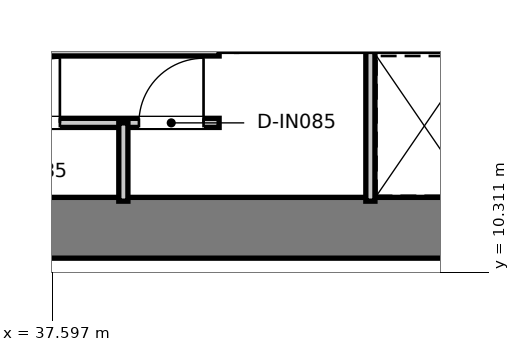
"""IFC4 building model, lengths in metres.
Left out: names, types, materials, properties, quantities, classifications, styles, units other than length and angle.
Written with IfcOpenShell. Run it as: python <this file> out.ifc"""

import sys

from ifc_helpers import new_model, si_unit, direction, frame, frame_2d, origin, place, context, subcontext, project, spatial, rectangle, extrude, element, fill, save


model = new_model("IFC4")
c1 = context("Model", 3, precision=1e-05, world=origin(), true_north=direction((0.0, 1.0)))
c2 = subcontext(c1, "Body", "Model", "MODEL_VIEW")
j1 = project(units=[si_unit("LENGTHUNIT", "METRE"), si_unit("PLANEANGLEUNIT", "RADIAN")], contexts=[c1])
p1 = place(None, origin())
s1 = spatial("IfcSite", under=j1, at=p1, CompositionType="ELEMENT")
p2 = place(p1, origin())
s2 = spatial("IfcBuilding", under=s1, at=p2, CompositionType="ELEMENT")
p3 = place(p2, frame((0.0, 0.0, 185.7)))
s3 = spatial("IfcBuildingStorey", under=s2, at=p3, CompositionType="ELEMENT", Elevation=185.7)
p4 = place(p3, frame((28.08, 10.9, 0.0), z_axis=(0.0, 0.0, 1.0), x_axis=(1.0, 0.0, 0.0)))
e1 = element("IfcWall", 1, at=p4, inside=s3, PredefinedType="SHEAR", context=c2, shape_type="SweptSolid", body=[
    extrude(rectangle(XDim=15.84, YDim=0.8, at=frame_2d((7.92, 0.0))), origin(), (0.0, 0.0, 1.0), 3.95),
])
p5 = place(p3, frame((41.78, 11.25, 0.0), z_axis=(0.0, 0.0, 1.0), x_axis=(0.0, 1.0, 0.0)))
e2 = element("IfcWall", 2, at=p5, inside=s3, PredefinedType="PARTITIONING", context=c2, shape_type="SweptSolid", body=[
    extrude(rectangle(XDim=1.97, YDim=0.12, at=frame_2d((0.985, 0.0))), origin(), (0.0, 0.0, 1.0), 3.67),
])
p6 = place(p3, frame((32.21, 13.22, 0.0), z_axis=(0.0, 0.0, 1.0), x_axis=(1.0, 0.0, 0.0)))
e3 = element("IfcWall", 3, at=p6, inside=s3, PredefinedType="PARTITIONING", context=c2, shape_type="SweptSolid", body=[
    extrude(rectangle(XDim=7.58, YDim=0.12, at=frame_2d((3.79, 0.0))), origin(), (0.0, 0.0, 1.0), 3.67),
])
p7 = place(p6, frame((3.365, 0.0, 0.0)))
e4 = element("IfcOpeningElement", 4, at=p7, cuts=e3, PredefinedType="OPENING", context=c2, shape_type="SweptSolid", body=[
    extrude(rectangle(XDim=0.85, YDim=2.1, at=frame_2d((0.425, 1.05))), frame((0.0, 0.07, 0.0), z_axis=(0.0, -1.0, 0.0), x_axis=(1.0, 0.0, 0.0)), (0.0, 0.0, 1.0), 0.14),
])
p8 = place(p3, frame((32.21, 12.28, 0.0), z_axis=(0.0, 0.0, 1.0), x_axis=(1.0, 0.0, 0.0)))
e5 = element("IfcWall", 5, at=p8, inside=s3, PredefinedType="PARTITIONING", context=c2, shape_type="SweptSolid", body=[
    extrude(rectangle(XDim=7.58, YDim=0.12, at=frame_2d((3.79, 0.0))), origin(), (0.0, 0.0, 1.0), 3.67),
])
p9 = place(p8, frame((0.205, 0.0, 0.0)))
e6 = element("IfcOpeningElement", 6, at=p9, cuts=e5, PredefinedType="OPENING", context=c2, shape_type="SweptSolid", body=[
    extrude(rectangle(XDim=0.85, YDim=2.1, at=frame_2d((0.425, 1.05))), frame((0.0, 0.07, 0.0), z_axis=(0.0, -1.0, 0.0), x_axis=(1.0, 0.0, 0.0)), (0.0, 0.0, 1.0), 0.14),
])
p10 = place(p8, frame((2.095, 0.0, 0.0)))
e7 = element("IfcOpeningElement", 7, at=p10, cuts=e5, PredefinedType="OPENING", context=c2, shape_type="SweptSolid", body=[
    extrude(rectangle(XDim=0.85, YDim=2.1, at=frame_2d((0.425, 1.05))), frame((0.0, 0.07, 0.0), z_axis=(0.0, -1.0, 0.0), x_axis=(1.0, 0.0, 0.0)), (0.0, 0.0, 1.0), 0.14),
])
p11 = place(p8, frame((4.635, 0.0, 0.0)))
e8 = element("IfcOpeningElement", 8, at=p11, cuts=e5, PredefinedType="OPENING", context=c2, shape_type="SweptSolid", body=[
    extrude(rectangle(XDim=0.85, YDim=2.1, at=frame_2d((0.425, 1.05))), frame((0.0, 0.07, 0.0), z_axis=(0.0, -1.0, 0.0), x_axis=(1.0, 0.0, 0.0)), (0.0, 0.0, 1.0), 0.14),
])
p12 = place(p8, frame((6.525, 0.0, 0.0)))
e9 = element("IfcOpeningElement", 9, at=p12, cuts=e5, PredefinedType="OPENING", context=c2, shape_type="SweptSolid", body=[
    extrude(rectangle(XDim=0.85, YDim=2.1, at=frame_2d((0.425, 1.05))), frame((0.0, 0.07, 0.0), z_axis=(0.0, -1.0, 0.0), x_axis=(1.0, 0.0, 0.0)), (0.0, 0.0, 1.0), 0.14),
])
p13 = place(p3, frame((38.53, 11.25, 0.0), z_axis=(0.0, 0.0, 1.0), x_axis=(0.0, 1.0, 0.0)))
e10 = element("IfcWall", 10, at=p13, inside=s3, PredefinedType="PARTITIONING", context=c2, shape_type="SweptSolid", body=[
    extrude(rectangle(XDim=1.03, YDim=0.12, at=frame_2d((0.515, 0.0))), origin(), (0.0, 0.0, 1.0), 3.67),
])
p14 = place(p11, origin())
e11 = element("IfcDoor", 11, at=p14, inside=s3, OperationType="SINGLE_SWING_RIGHT", PredefinedType="DOOR", context=c2, shape_type="SweptSolid", body=[
    extrude(rectangle(XDim=0.85, YDim=2.1, at=frame_2d((0.425, 1.05))), frame((0.0, 0.025, 0.0), z_axis=(0.0, -1.0, 0.0), x_axis=(1.0, 0.0, 0.0)), (0.0, 0.0, 1.0), 0.05),
])
fill(e8, e11)
p15 = place(p12, origin())
e12 = element("IfcDoor", 12, at=p15, inside=s3, OperationType="SINGLE_SWING_RIGHT", PredefinedType="DOOR", context=c2, shape_type="SweptSolid", body=[
    extrude(rectangle(XDim=0.85, YDim=2.1, at=frame_2d((0.425, 1.05))), frame((0.0, 0.025, 0.0), z_axis=(0.0, -1.0, 0.0), x_axis=(1.0, 0.0, 0.0)), (0.0, 0.0, 1.0), 0.05),
])
fill(e9, e12)
save(model, sys.argv[1])
